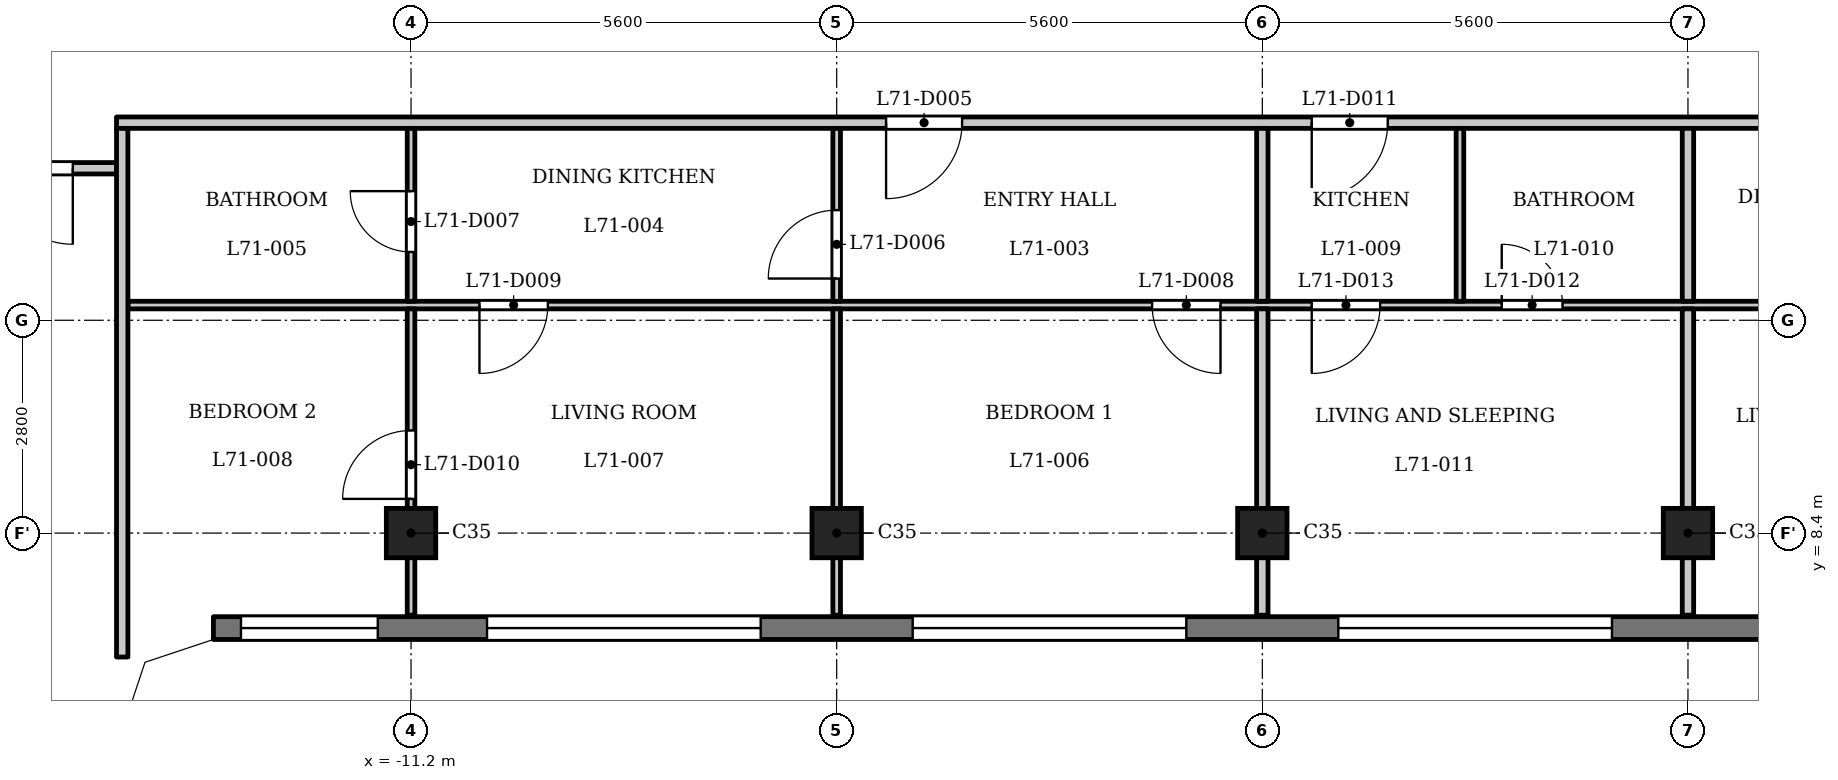
"""IFC4 building model, lengths in metres.
Left out: names, types, materials, properties, quantities, classifications, styles, units other than length and angle.
Written with IfcOpenShell. Run it as: python <this file> out.ifc"""

import sys

from ifc_helpers import new_model, si_unit, direction, frame, frame_2d, origin, origin_2d, place, context, subcontext, project, spatial, polyline, rectangle, outline, extrude, element, fill, save


model = new_model("IFC4")
c1 = context("Model", 3, precision=1e-05, world=origin(), true_north=direction((0.0, 1.0)))
c2 = subcontext(c1, "Body", "Model", "MODEL_VIEW")
j1 = project(units=[si_unit("LENGTHUNIT", "METRE"), si_unit("PLANEANGLEUNIT", "RADIAN")], contexts=[c1])
p1 = place(None, origin())
s1 = spatial("IfcSite", under=j1, at=p1, CompositionType="ELEMENT")
p2 = place(p1, origin())
s2 = spatial("IfcBuilding", under=s1, at=p2, CompositionType="ELEMENT")
p3 = place(p2, frame((0.0, 0.0, 273.2)))
s3 = spatial("IfcBuildingStorey", under=s2, at=p3, CompositionType="ELEMENT", Elevation=273.2)
for number, where, z_axis, x_axis in (
    (1, (-11.2, 8.4, 0.0), (0.0, 0.0, 1.0), (1.0, 0.0, 0.0)),
    (2, (-5.6, 8.4, 0.0), (0.0, 0.0, 1.0), (1.0, 0.0, 0.0)),
    (3, (0.0, 8.4, 0.0), (0.0, 0.0, 1.0), (1.0, 0.0, 0.0)),
    (4, (5.6, 8.4, 0.0), (0.0, 0.0, 1.0), (1.0, 0.0, 0.0)),
):
    element("IfcColumn", number, at=place(p3, frame(where, z_axis=z_axis, x_axis=x_axis)), inside=s3, PredefinedType="COLUMN", context=c2, shape_type="SweptSolid", body=[
        extrude(rectangle(XDim=0.65, YDim=0.65, at=origin_2d()), origin(), (0.0, 0.0, 1.0), 3.5),
    ])
p4 = place(p3, frame((-13.8, 7.15, 0.0), z_axis=(0.0, 0.0, 1.0), x_axis=(1.0, 0.0, 0.0)))
e5 = element("IfcWall", 5, at=p4, inside=s3, PredefinedType="SOLIDWALL", context=c2, shape_type="SweptSolid", body=[
    extrude(rectangle(XDim=27.6, YDim=0.3, at=frame_2d((13.8, 0.0))), origin(), (0.0, 0.0, 1.0), 3.2),
])
p5 = place(p4, frame((0.363, 0.0, 0.9)))
e6 = element("IfcOpeningElement", 6, at=p5, cuts=e5, PredefinedType="OPENING", context=c2, shape_type="SweptSolid", body=[
    extrude(rectangle(XDim=1.8, YDim=1.25, at=frame_2d((0.9, 0.625))), frame((0.0, 0.16, 0.0), z_axis=(0.0, -1.0, 0.0), x_axis=(1.0, 0.0, 0.0)), (0.0, 0.0, 1.0), 0.32),
])
p6 = place(p4, frame((3.6, 0.0, 1.2)))
e7 = element("IfcOpeningElement", 7, at=p6, cuts=e5, PredefinedType="OPENING", context=c2, shape_type="SweptSolid", body=[
    extrude(rectangle(XDim=3.6, YDim=0.95, at=frame_2d((1.8, 0.475))), frame((0.0, 0.16, 0.0), z_axis=(0.0, -1.0, 0.0), x_axis=(1.0, 0.0, 0.0)), (0.0, 0.0, 1.0), 0.32),
])
p7 = place(p4, frame((9.2, 0.0, 1.2)))
e8 = element("IfcOpeningElement", 8, at=p7, cuts=e5, PredefinedType="OPENING", context=c2, shape_type="SweptSolid", body=[
    extrude(rectangle(XDim=3.6, YDim=0.95, at=frame_2d((1.8, 0.475))), frame((0.0, 0.16, 0.0), z_axis=(0.0, -1.0, 0.0), x_axis=(1.0, 0.0, 0.0)), (0.0, 0.0, 1.0), 0.32),
])
p8 = place(p4, frame((14.8, 0.0, 1.2)))
e9 = element("IfcOpeningElement", 9, at=p8, cuts=e5, PredefinedType="OPENING", context=c2, shape_type="SweptSolid", body=[
    extrude(rectangle(XDim=3.6, YDim=0.95, at=frame_2d((1.8, 0.475))), frame((0.0, 0.16, 0.0), z_axis=(0.0, -1.0, 0.0), x_axis=(1.0, 0.0, 0.0)), (0.0, 0.0, 1.0), 0.32),
])
p9 = place(p4, frame((20.4, 0.0, 1.2)))
e10 = element("IfcOpeningElement", 10, at=p9, cuts=e5, PredefinedType="OPENING", context=c2, shape_type="SweptSolid", body=[
    extrude(rectangle(XDim=3.6, YDim=0.95, at=frame_2d((1.8, 0.475))), frame((0.0, 0.16, 0.0), z_axis=(0.0, -1.0, 0.0), x_axis=(1.0, 0.0, 0.0)), (0.0, 0.0, 1.0), 0.32),
])
p10 = place(p4, frame((25.438, 0.0, 0.9)))
e11 = element("IfcOpeningElement", 11, at=p10, cuts=e5, PredefinedType="OPENING", context=c2, shape_type="SweptSolid", body=[
    extrude(rectangle(XDim=1.8, YDim=1.25, at=frame_2d((0.9, 0.625))), frame((0.0, 0.16, 0.0), z_axis=(0.0, -1.0, 0.0), x_axis=(1.0, 0.0, 0.0)), (0.0, 0.0, 1.0), 0.32),
])
p11 = place(p3, frame((-14.925, 11.4, 0.0), z_axis=(0.0, 0.0, 1.0), x_axis=(1.0, 0.0, 0.0)))
e12 = element("IfcWall", 12, at=p11, inside=s3, PredefinedType="PARTITIONING", context=c2, shape_type="SweptSolid", body=[
    extrude(rectangle(XDim=29.85, YDim=0.1, at=frame_2d((14.925, 0.0))), origin(), (0.0, 0.0, 1.0), 3.2),
])
p12 = place(p11, frame((13.475, 0.0, 0.0)))
e13 = element("IfcOpeningElement", 13, at=p12, cuts=e12, PredefinedType="OPENING", context=c2, shape_type="SweptSolid", body=[
    extrude(rectangle(XDim=0.9, YDim=2.1, at=frame_2d((0.45, 1.05))), frame((0.0, 0.06, 0.0), z_axis=(0.0, -1.0, 0.0), x_axis=(1.0, 0.0, 0.0)), (0.0, 0.0, 1.0), 0.12),
])
p13 = place(p11, frame((4.625, 0.0, 0.0)))
e14 = element("IfcOpeningElement", 14, at=p13, cuts=e12, PredefinedType="OPENING", context=c2, shape_type="SweptSolid", body=[
    extrude(rectangle(XDim=0.9, YDim=2.1, at=frame_2d((0.45, 1.05))), frame((0.0, 0.06, 0.0), z_axis=(0.0, -1.0, 0.0), x_axis=(1.0, 0.0, 0.0)), (0.0, 0.0, 1.0), 0.12),
])
p14 = place(p11, frame((18.075, 0.0, 0.0)))
e15 = element("IfcOpeningElement", 15, at=p14, cuts=e12, PredefinedType="OPENING", context=c2, shape_type="SweptSolid", body=[
    extrude(rectangle(XDim=0.8, YDim=2.1, at=frame_2d((0.4, 1.05))), frame((0.0, 0.06, 0.0), z_axis=(0.0, -1.0, 0.0), x_axis=(1.0, 0.0, 0.0)), (0.0, 0.0, 1.0), 0.12),
])
p15 = place(p11, frame((15.575, 0.0, 0.0)))
e16 = element("IfcOpeningElement", 16, at=p15, cuts=e12, PredefinedType="OPENING", context=c2, shape_type="SweptSolid", body=[
    extrude(rectangle(XDim=0.9, YDim=2.1, at=frame_2d((0.45, 1.05))), frame((0.0, 0.06, 0.0), z_axis=(0.0, -1.0, 0.0), x_axis=(1.0, 0.0, 0.0)), (0.0, 0.0, 1.0), 0.12),
])
p16 = place(p11, frame((28.474, 0.0, 0.0)))
e17 = element("IfcOpeningElement", 17, at=p16, cuts=e12, PredefinedType="OPENING", context=c2, shape_type="SweptSolid", body=[
    extrude(rectangle(XDim=0.8, YDim=2.1, at=frame_2d((0.4, 1.05))), frame((0.0, 0.06, 0.0), z_axis=(0.0, -1.0, 0.0), x_axis=(1.0, 0.0, 0.0)), (0.0, 0.0, 1.0), 0.12),
])
p17 = place(p11, frame((23.425, 0.0, 0.0)))
e18 = element("IfcOpeningElement", 18, at=p17, cuts=e12, PredefinedType="OPENING", context=c2, shape_type="SweptSolid", body=[
    extrude(rectangle(XDim=0.9, YDim=2.1, at=frame_2d((0.45, 1.05))), frame((0.0, 0.06, 0.0), z_axis=(0.0, -1.0, 0.0), x_axis=(1.0, 0.0, 0.0)), (0.0, 0.0, 1.0), 0.12),
])
p18 = place(p3, frame((-17.4, 13.2, 0.0), z_axis=(0.0, 0.0, 1.0), x_axis=(1.0, 0.0, 0.0)))
e19 = element("IfcWall", 19, at=p18, inside=s3, PredefinedType="PARTITIONING", context=c2, shape_type="SweptSolid", body=[
    extrude(rectangle(XDim=2.325, YDim=0.15, at=frame_2d((1.163, 0.0))), origin(), (0.0, 0.0, 1.0), 3.2),
])
p19 = place(p18, frame((0.75, 0.0, 0.0)))
e20 = element("IfcOpeningElement", 20, at=p19, cuts=e19, PredefinedType="OPENING", context=c2, shape_type="SweptSolid", body=[
    extrude(rectangle(XDim=1.0, YDim=2.1, at=frame_2d((0.5, 1.05))), frame((0.0, 0.085, 0.0), z_axis=(0.0, -1.0, 0.0), x_axis=(1.0, 0.0, 0.0)), (0.0, 0.0, 1.0), 0.17),
])
p20 = place(p3, frame((-15.075, 13.8, 0.0), z_axis=(0.0, 0.0, 1.0), x_axis=(1.0, 0.0, 0.0)))
e21 = element("IfcWall", 21, at=p20, inside=s3, PredefinedType="PARTITIONING", context=c2, shape_type="SweptSolid", body=[
    extrude(rectangle(XDim=30.15, YDim=0.15, at=frame_2d((15.075, 0.0))), origin(), (0.0, 0.0, 1.0), 3.2),
])
p21 = place(p20, frame((10.125, 0.0, 0.0)))
e22 = element("IfcOpeningElement", 22, at=p21, cuts=e21, PredefinedType="OPENING", context=c2, shape_type="SweptSolid", body=[
    extrude(rectangle(XDim=1.0, YDim=2.1, at=frame_2d((0.5, 1.05))), frame((0.0, 0.085, 0.0), z_axis=(0.0, -1.0, 0.0), x_axis=(1.0, 0.0, 0.0)), (0.0, 0.0, 1.0), 0.17),
])
p22 = place(p20, frame((15.725, 0.0, 0.0)))
e23 = element("IfcOpeningElement", 23, at=p22, cuts=e21, PredefinedType="OPENING", context=c2, shape_type="SweptSolid", body=[
    extrude(rectangle(XDim=1.0, YDim=2.1, at=frame_2d((0.5, 1.05))), frame((0.0, 0.085, 0.0), z_axis=(0.0, -1.0, 0.0), x_axis=(1.0, 0.0, 0.0)), (0.0, 0.0, 1.0), 0.17),
])
p23 = place(p20, frame((24.575, 0.0, 0.0)))
e24 = element("IfcOpeningElement", 24, at=p23, cuts=e21, PredefinedType="OPENING", context=c2, shape_type="SweptSolid", body=[
    extrude(rectangle(XDim=1.0, YDim=2.1, at=frame_2d((0.5, 1.05))), frame((0.0, 0.085, 0.0), z_axis=(0.0, -1.0, 0.0), x_axis=(1.0, 0.0, 0.0)), (0.0, 0.0, 1.0), 0.17),
])
p24 = place(p3, frame((-15.0, 6.769, 0.0), z_axis=(0.0, 0.0, 1.0), x_axis=(0.0, 1.0, 0.0)))
e25 = element("IfcWall", 25, at=p24, inside=s3, PredefinedType="PARTITIONING", context=c2, shape_type="SweptSolid", body=[
    extrude(rectangle(XDim=6.956, YDim=0.15, at=frame_2d((3.478, 0.0))), origin(), (0.0, 0.0, 1.0), 3.2),
])
p25 = place(p3, frame((-11.2, 7.32, 0.0), z_axis=(0.0, 0.0, 1.0), x_axis=(0.0, 1.0, 0.0)))
e26 = element("IfcWall", 26, at=p25, inside=s3, PredefinedType="PARTITIONING", context=c2, shape_type="SweptSolid", body=[
    extrude(rectangle(XDim=4.03, YDim=0.1, at=frame_2d((2.015, 0.0))), origin(), (0.0, 0.0, 1.0), 3.2),
])
p26 = place(p25, frame((1.53, 0.0, 0.0)))
e27 = element("IfcOpeningElement", 27, at=p26, cuts=e26, PredefinedType="OPENING", context=c2, shape_type="SweptSolid", body=[
    extrude(rectangle(XDim=0.9, YDim=2.1, at=frame_2d((0.45, 1.05))), frame((0.0, 0.06, 0.0), z_axis=(0.0, -1.0, 0.0), x_axis=(1.0, 0.0, 0.0)), (0.0, 0.0, 1.0), 0.12),
])
p27 = place(p3, frame((-11.2, 11.45, 0.0), z_axis=(0.0, 0.0, 1.0), x_axis=(0.0, 1.0, 0.0)))
e28 = element("IfcWall", 28, at=p27, inside=s3, PredefinedType="PARTITIONING", context=c2, shape_type="SweptSolid", body=[
    extrude(rectangle(XDim=2.275, YDim=0.1, at=frame_2d((1.138, 0.0))), origin(), (0.0, 0.0, 1.0), 3.2),
])
p28 = place(p27, frame((0.649, 0.0, 0.0)))
e29 = element("IfcOpeningElement", 29, at=p28, cuts=e28, PredefinedType="OPENING", context=c2, shape_type="SweptSolid", body=[
    extrude(rectangle(XDim=0.8, YDim=2.1, at=frame_2d((0.4, 1.05))), frame((0.0, 0.06, 0.0), z_axis=(0.0, -1.0, 0.0), x_axis=(1.0, 0.0, 0.0)), (0.0, 0.0, 1.0), 0.12),
])
p29 = place(p3, frame((-5.6, 7.32, 0.0), z_axis=(0.0, 0.0, 1.0), x_axis=(0.0, 1.0, 0.0)))
e30 = element("IfcWall", 30, at=p29, inside=s3, PredefinedType="PARTITIONING", context=c2, shape_type="SweptSolid", body=[
    extrude(rectangle(XDim=4.03, YDim=0.1, at=frame_2d((2.015, 0.0))), origin(), (0.0, 0.0, 1.0), 3.2),
])
p30 = place(p3, frame((-5.6, 11.45, 0.0), z_axis=(0.0, 0.0, 1.0), x_axis=(0.0, 1.0, 0.0)))
e31 = element("IfcWall", 31, at=p30, inside=s3, PredefinedType="PARTITIONING", context=c2, shape_type="SweptSolid", body=[
    extrude(rectangle(XDim=2.275, YDim=0.1, at=frame_2d((1.138, 0.0))), origin(), (0.0, 0.0, 1.0), 3.2),
])
p31 = place(p30, frame((0.299, 0.0, 0.0)))
e32 = element("IfcOpeningElement", 32, at=p31, cuts=e31, PredefinedType="OPENING", context=c2, shape_type="SweptSolid", body=[
    extrude(rectangle(XDim=0.9, YDim=2.1, at=frame_2d((0.45, 1.05))), frame((0.0, 0.06, 0.0), z_axis=(0.0, -1.0, 0.0), x_axis=(1.0, 0.0, 0.0)), (0.0, 0.0, 1.0), 0.12),
])
p32 = place(p3, frame((0.0, 7.32, 0.0), z_axis=(0.0, 0.0, 1.0), x_axis=(0.0, 1.0, 0.0)))
e33 = element("IfcWall", 33, at=p32, inside=s3, PredefinedType="PARTITIONING", context=c2, shape_type="SweptSolid", body=[
    extrude(rectangle(XDim=4.03, YDim=0.15, at=frame_2d((2.015, 0.0))), origin(), (0.0, 0.0, 1.0), 3.2),
])
p33 = place(p3, frame((0.0, 11.45, 0.0), z_axis=(0.0, 0.0, 1.0), x_axis=(0.0, 1.0, 0.0)))
e34 = element("IfcWall", 34, at=p33, inside=s3, PredefinedType="PARTITIONING", context=c2, shape_type="SweptSolid", body=[
    extrude(rectangle(XDim=2.275, YDim=0.15, at=frame_2d((1.138, 0.0))), origin(), (0.0, 0.0, 1.0), 3.2),
])
p34 = place(p3, frame((2.6, 11.45, 0.0), z_axis=(0.0, 0.0, 1.0), x_axis=(0.0, 1.0, 0.0)))
e35 = element("IfcWall", 35, at=p34, inside=s3, PredefinedType="PARTITIONING", context=c2, shape_type="SweptSolid", body=[
    extrude(rectangle(XDim=2.275, YDim=0.1, at=frame_2d((1.138, 0.0))), origin(), (0.0, 0.0, 1.0), 3.2),
])
p35 = place(p3, frame((5.6, 7.32, 0.0), z_axis=(0.0, 0.0, 1.0), x_axis=(0.0, 1.0, 0.0)))
e36 = element("IfcWall", 36, at=p35, inside=s3, PredefinedType="PARTITIONING", context=c2, shape_type="SweptSolid", body=[
    extrude(rectangle(XDim=4.03, YDim=0.15, at=frame_2d((2.015, 0.0))), origin(), (0.0, 0.0, 1.0), 3.2),
])
p36 = place(p3, frame((5.6, 11.45, 0.0), z_axis=(0.0, 0.0, 1.0), x_axis=(0.0, 1.0, 0.0)))
e37 = element("IfcWall", 37, at=p36, inside=s3, PredefinedType="PARTITIONING", context=c2, shape_type="SweptSolid", body=[
    extrude(rectangle(XDim=2.275, YDim=0.15, at=frame_2d((1.138, 0.0))), origin(), (0.0, 0.0, 1.0), 3.2),
])
p37 = place(p3, origin())
e38 = element("IfcWall", 38, at=p37, inside=s3, PredefinedType="SOLIDWALL", context=c2, shape_type="SweptSolid", body=[
    extrude(outline(polyline([(-13.849, 7.3), (-14.937, 6.937), (-15.3, 5.849), (-15.3, 5.8), (-15.0, 5.8), (-14.7, 6.7), (-13.8, 7.0), (-13.8, 7.3), (-13.849, 7.3)])), origin(), (0.0, 0.0, 1.0), 3.2),
])
p38 = place(p19, origin())
e39 = element("IfcDoor", 39, at=p38, inside=s3, OperationType="SINGLE_SWING_RIGHT", PredefinedType="DOOR", context=c2, shape_type="SweptSolid", body=[
    extrude(rectangle(XDim=1.0, YDim=2.1, at=frame_2d((0.5, 1.05))), frame((0.0, 0.025, 0.0), z_axis=(0.0, -1.0, 0.0), x_axis=(1.0, 0.0, 0.0)), (0.0, 0.0, 1.0), 0.05),
])
fill(e20, e39)
p39 = place(p21, origin())
e40 = element("IfcDoor", 40, at=p39, inside=s3, OperationType="SINGLE_SWING_LEFT", PredefinedType="DOOR", context=c2, shape_type="SweptSolid", body=[
    extrude(rectangle(XDim=1.0, YDim=2.1, at=frame_2d((0.5, 1.05))), frame((0.0, 0.025, 0.0), z_axis=(0.0, -1.0, 0.0), x_axis=(1.0, 0.0, 0.0)), (0.0, 0.0, 1.0), 0.05),
])
fill(e22, e40)
p40 = place(p31, origin())
e41 = element("IfcDoor", 41, at=p40, inside=s3, OperationType="SINGLE_SWING_RIGHT", PredefinedType="DOOR", context=c2, shape_type="SweptSolid", body=[
    extrude(rectangle(XDim=0.9, YDim=2.1, at=frame_2d((0.45, 1.05))), frame((0.0, 0.025, 0.0), z_axis=(0.0, -1.0, 0.0), x_axis=(1.0, 0.0, 0.0)), (0.0, 0.0, 1.0), 0.05),
])
fill(e32, e41)
p41 = place(p28, origin())
e42 = element("IfcDoor", 42, at=p41, inside=s3, OperationType="SINGLE_SWING_LEFT", PredefinedType="DOOR", context=c2, shape_type="SweptSolid", body=[
    extrude(rectangle(XDim=0.8, YDim=2.1, at=frame_2d((0.4, 1.05))), frame((0.0, 0.025, 0.0), z_axis=(0.0, -1.0, 0.0), x_axis=(1.0, 0.0, 0.0)), (0.0, 0.0, 1.0), 0.05),
])
fill(e29, e42)
p42 = place(p12, origin())
e43 = element("IfcDoor", 43, at=p42, inside=s3, OperationType="SINGLE_SWING_RIGHT", PredefinedType="DOOR", context=c2, shape_type="SweptSolid", body=[
    extrude(rectangle(XDim=0.9, YDim=2.1, at=frame_2d((0.45, 1.05))), frame((0.0, 0.025, 0.0), z_axis=(0.0, -1.0, 0.0), x_axis=(1.0, 0.0, 0.0)), (0.0, 0.0, 1.0), 0.05),
])
fill(e13, e43)
p43 = place(p13, origin())
e44 = element("IfcDoor", 44, at=p43, inside=s3, OperationType="SINGLE_SWING_LEFT", PredefinedType="DOOR", context=c2, shape_type="SweptSolid", body=[
    extrude(rectangle(XDim=0.9, YDim=2.1, at=frame_2d((0.45, 1.05))), frame((0.0, 0.025, 0.0), z_axis=(0.0, -1.0, 0.0), x_axis=(1.0, 0.0, 0.0)), (0.0, 0.0, 1.0), 0.05),
])
fill(e14, e44)
p44 = place(p26, origin())
e45 = element("IfcDoor", 45, at=p44, inside=s3, OperationType="SINGLE_SWING_RIGHT", PredefinedType="DOOR", context=c2, shape_type="SweptSolid", body=[
    extrude(rectangle(XDim=0.9, YDim=2.1, at=frame_2d((0.45, 1.05))), frame((0.0, 0.025, 0.0), z_axis=(0.0, -1.0, 0.0), x_axis=(1.0, 0.0, 0.0)), (0.0, 0.0, 1.0), 0.05),
])
fill(e27, e45)
p45 = place(p22, origin())
e46 = element("IfcDoor", 46, at=p45, inside=s3, OperationType="SINGLE_SWING_LEFT", PredefinedType="DOOR", context=c2, shape_type="SweptSolid", body=[
    extrude(rectangle(XDim=1.0, YDim=2.1, at=frame_2d((0.5, 1.05))), frame((0.0, 0.025, 0.0), z_axis=(0.0, -1.0, 0.0), x_axis=(1.0, 0.0, 0.0)), (0.0, 0.0, 1.0), 0.05),
])
fill(e23, e46)
p46 = place(p14, origin())
e47 = element("IfcDoor", 47, at=p46, inside=s3, OperationType="SINGLE_SWING_RIGHT", PredefinedType="DOOR", context=c2, shape_type="SweptSolid", body=[
    extrude(rectangle(XDim=0.8, YDim=2.1, at=frame_2d((0.4, 1.05))), frame((0.0, 0.025, 0.0), z_axis=(0.0, -1.0, 0.0), x_axis=(1.0, 0.0, 0.0)), (0.0, 0.0, 1.0), 0.05),
])
fill(e15, e47)
p47 = place(p15, origin())
e48 = element("IfcDoor", 48, at=p47, inside=s3, OperationType="SINGLE_SWING_LEFT", PredefinedType="DOOR", context=c2, shape_type="SweptSolid", body=[
    extrude(rectangle(XDim=0.9, YDim=2.1, at=frame_2d((0.45, 1.05))), frame((0.0, 0.025, 0.0), z_axis=(0.0, -1.0, 0.0), x_axis=(1.0, 0.0, 0.0)), (0.0, 0.0, 1.0), 0.05),
])
fill(e16, e48)
p48 = place(p5, origin())
e49 = element("IfcWindow", 49, at=p48, inside=s3, PartitioningType="SINGLE_PANEL", PredefinedType="WINDOW", context=c2, shape_type="SweptSolid", body=[
    extrude(rectangle(XDim=1.8, YDim=1.25, at=frame_2d((0.9, 0.625))), frame((0.0, 0.03, 0.0), z_axis=(0.0, -1.0, 0.0), x_axis=(1.0, 0.0, 0.0)), (0.0, 0.0, 1.0), 0.06),
])
fill(e6, e49)
p49 = place(p6, origin())
e50 = element("IfcWindow", 50, at=p49, inside=s3, PartitioningType="SINGLE_PANEL", PredefinedType="WINDOW", context=c2, shape_type="SweptSolid", body=[
    extrude(rectangle(XDim=3.6, YDim=0.95, at=frame_2d((1.8, 0.475))), frame((0.0, 0.03, 0.0), z_axis=(0.0, -1.0, 0.0), x_axis=(1.0, 0.0, 0.0)), (0.0, 0.0, 1.0), 0.06),
])
fill(e7, e50)
p50 = place(p7, origin())
e51 = element("IfcWindow", 51, at=p50, inside=s3, PartitioningType="SINGLE_PANEL", PredefinedType="WINDOW", context=c2, shape_type="SweptSolid", body=[
    extrude(rectangle(XDim=3.6, YDim=0.95, at=frame_2d((1.8, 0.475))), frame((0.0, 0.03, 0.0), z_axis=(0.0, -1.0, 0.0), x_axis=(1.0, 0.0, 0.0)), (0.0, 0.0, 1.0), 0.06),
])
fill(e8, e51)
p51 = place(p8, origin())
e52 = element("IfcWindow", 52, at=p51, inside=s3, PartitioningType="SINGLE_PANEL", PredefinedType="WINDOW", context=c2, shape_type="SweptSolid", body=[
    extrude(rectangle(XDim=3.6, YDim=0.95, at=frame_2d((1.8, 0.475))), frame((0.0, 0.03, 0.0), z_axis=(0.0, -1.0, 0.0), x_axis=(1.0, 0.0, 0.0)), (0.0, 0.0, 1.0), 0.06),
])
fill(e9, e52)
save(model, sys.argv[1])
